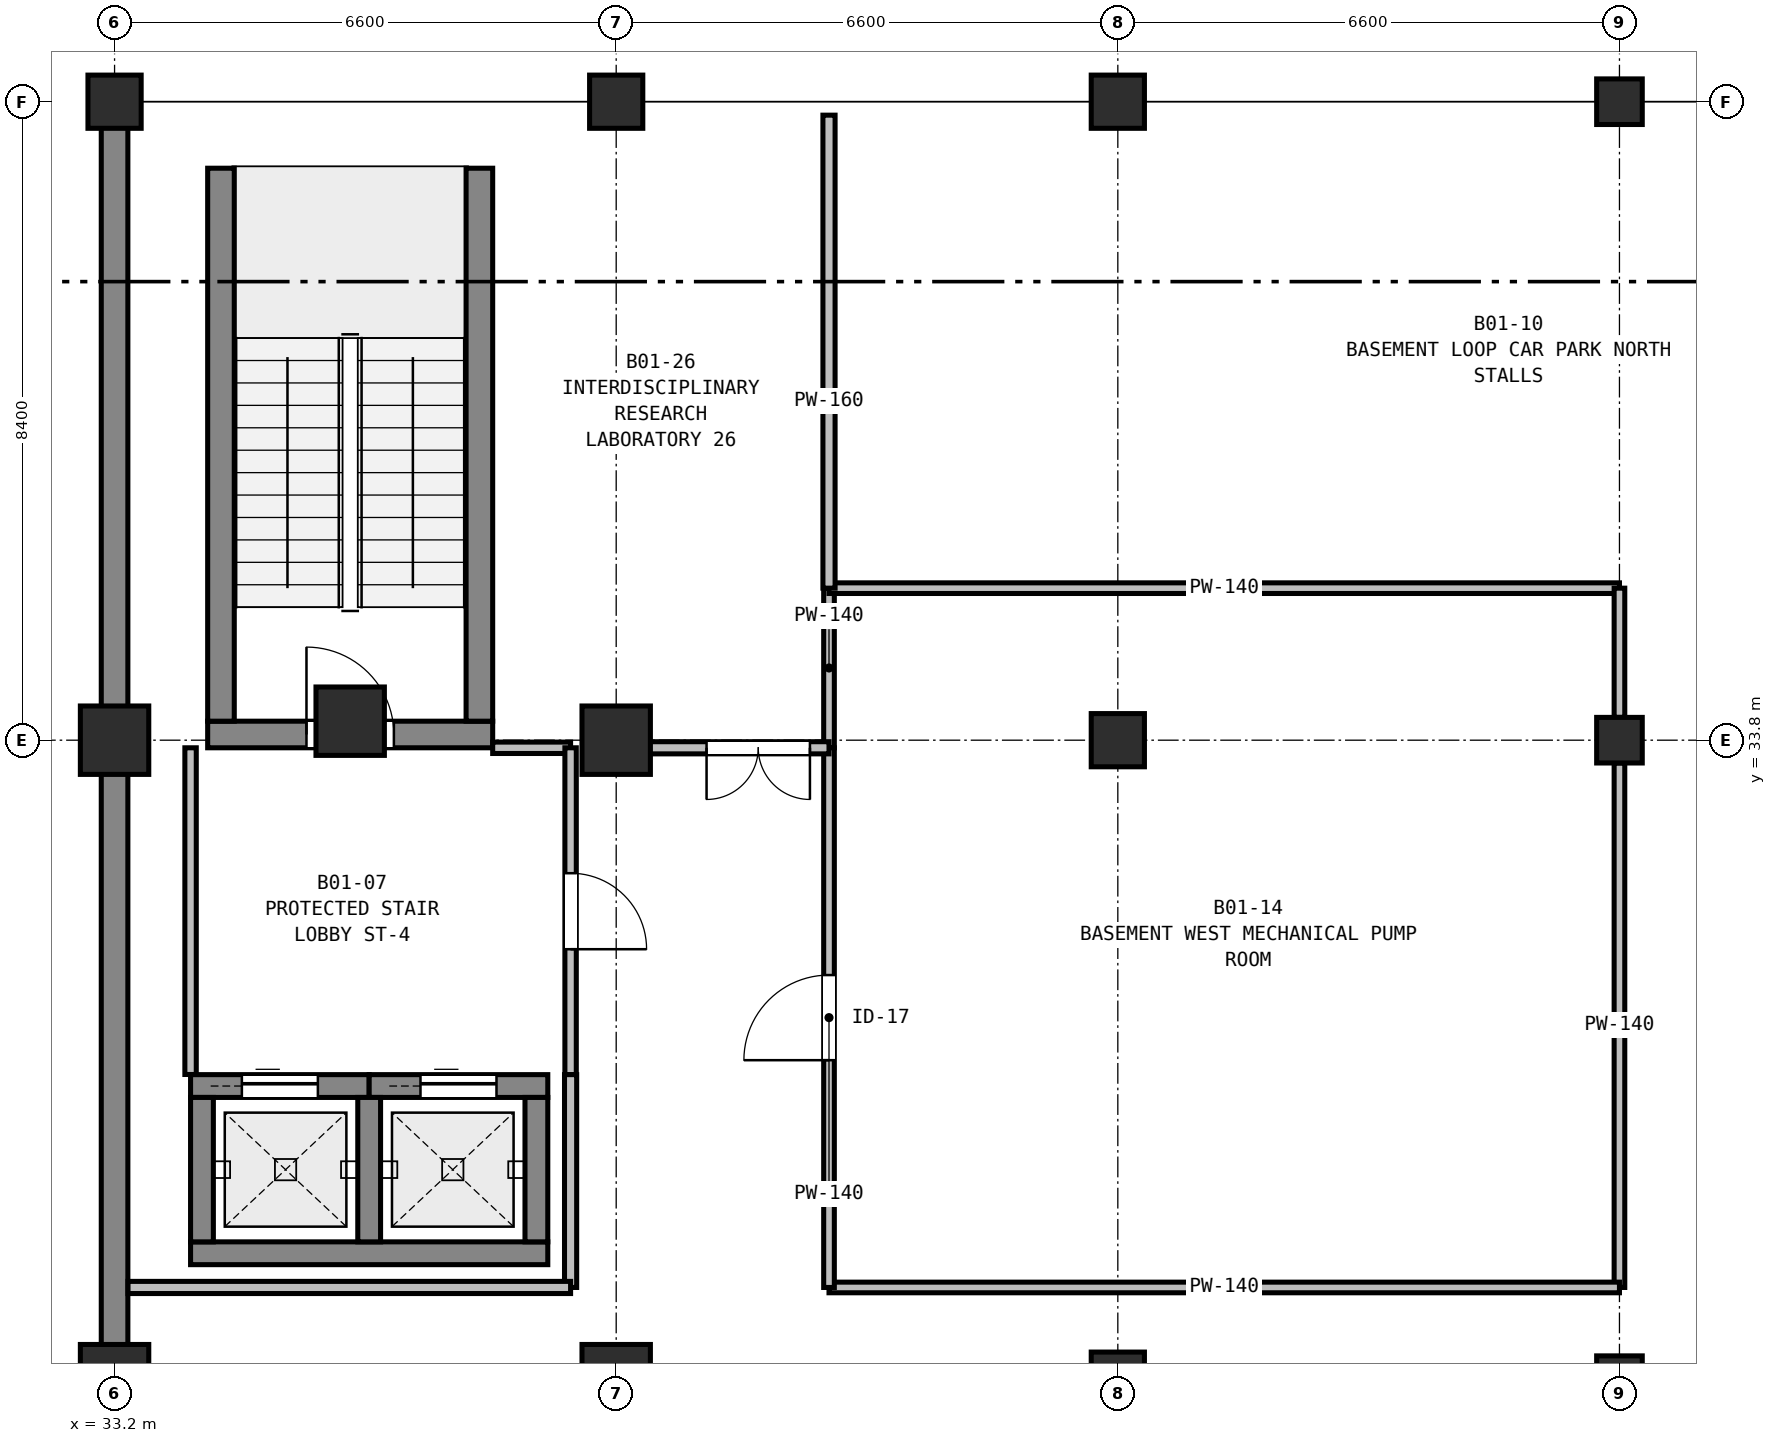
"""IFC4 building model, lengths in metres.
Left out: names, types, materials, properties, quantities, classifications, styles, units other than length and angle.
Written with IfcOpenShell. Run it as: python <this file> out.ifc"""

import sys

from ifc_helpers import new_model, si_unit, direction, frame, frame_2d, origin, origin_2d, place, context, subcontext, project, spatial, rectangle, extrude, element, fill, save


model = new_model("IFC4")
c1 = context("Model", 3, precision=1e-05, world=origin(), true_north=direction((0.0, 1.0)))
c2 = subcontext(c1, "Body", "Model", "MODEL_VIEW")
j1 = project(units=[si_unit("LENGTHUNIT", "METRE"), si_unit("PLANEANGLEUNIT", "RADIAN")], contexts=[c1])
p1 = place(None, origin())
s1 = spatial("IfcSite", under=j1, at=p1, CompositionType="ELEMENT")
p2 = place(p1, origin())
s2 = spatial("IfcBuilding", under=s1, at=p2, CompositionType="ELEMENT")
p3 = place(p2, frame((0.0, 0.0, -4.5)))
s3 = spatial("IfcBuildingStorey", under=s2, at=p3, CompositionType="ELEMENT", Elevation=-4.5)
for number, where, z_axis, x_axis in (
    (1, (33.2, 25.4, 0.0), (0.0, 0.0, 1.0), (1.0, 0.0, 0.0)),
    (2, (33.2, 33.8, 0.0), (0.0, 0.0, 1.0), (1.0, 0.0, 0.0)),
    (3, (33.2, 42.2, 0.0), (0.0, 0.0, 1.0), (1.0, 0.0, 0.0)),
    (4, (39.8, 25.4, 0.0), (0.0, 0.0, 1.0), (1.0, 0.0, 0.0)),
    (5, (39.8, 33.8, 0.0), (0.0, 0.0, 1.0), (1.0, 0.0, 0.0)),
    (6, (39.8, 42.2, 0.0), (0.0, 0.0, 1.0), (1.0, 0.0, 0.0)),
    (7, (46.4, 25.4, 0.0), (0.0, 0.0, 1.0), (1.0, 0.0, 0.0)),
    (8, (46.4, 33.8, 0.0), (0.0, 0.0, 1.0), (1.0, 0.0, 0.0)),
    (9, (46.4, 42.2, 0.0), (0.0, 0.0, 1.0), (1.0, 0.0, 0.0)),
):
    element("IfcColumn", number, at=place(p3, frame(where, z_axis=z_axis, x_axis=x_axis)), inside=s3, PredefinedType="COLUMN", context=c2, shape_type="SweptSolid", body=[
        extrude(rectangle(XDim=0.7, YDim=0.7, at=origin_2d()), origin(), (0.0, 0.0, 1.0), 4.5),
    ])
for number, where, z_axis, x_axis in (
    (10, (53.0, 25.4, 0.0), (0.0, 0.0, 1.0), (1.0, 0.0, 0.0)),
    (11, (53.0, 33.8, 0.0), (0.0, 0.0, 1.0), (1.0, 0.0, 0.0)),
    (12, (53.0, 42.2, 0.0), (0.0, 0.0, 1.0), (1.0, 0.0, 0.0)),
):
    element("IfcColumn", number, at=place(p3, frame(where, z_axis=z_axis, x_axis=x_axis)), inside=s3, PredefinedType="COLUMN", context=c2, shape_type="SweptSolid", body=[
        extrude(rectangle(XDim=0.6, YDim=0.6, at=origin_2d()), origin(), (0.0, 0.0, 1.0), 4.44),
    ])
p4 = place(p3, frame((34.425, 33.875, 0.0), z_axis=(0.0, 0.0, 1.0), x_axis=(1.0, 0.0, 0.0)))
e13 = element("IfcWall", 13, at=p4, inside=s3, PredefinedType="SHEAR", context=c2, shape_type="SweptSolid", body=[
    extrude(rectangle(XDim=3.75, YDim=0.35, at=frame_2d((1.875, 0.0))), origin(), (0.0, 0.0, 1.0), 4.5),
])
p5 = place(p4, frame((1.3, 0.0, 0.0)))
e14 = element("IfcOpeningElement", 14, at=p5, cuts=e13, PredefinedType="OPENING", context=c2, shape_type="SweptSolid", body=[
    extrude(rectangle(XDim=1.15, YDim=2.15, at=frame_2d((0.575, 1.075))), frame((0.0, 0.185, 0.0), z_axis=(0.0, -1.0, 0.0), x_axis=(1.0, 0.0, 0.0)), (0.0, 0.0, 1.0), 0.37),
])
p6 = place(p3, frame((34.425, 41.5, 0.0), z_axis=(0.0, 0.0, 1.0), x_axis=(1.0, 0.0, 0.0)))
e15 = element("IfcWall", 15, at=p6, inside=s3, PredefinedType="SHEAR", context=c2, shape_type="SweptSolid", body=[
    extrude(rectangle(XDim=3.75, YDim=0.35, at=frame_2d((1.875, 0.0))), origin(), (0.0, 0.0, 1.0), 4.5),
])
for number, where, z_axis, x_axis in (
    (16, (34.6, 34.05, 0.0), (0.0, 0.0, 1.0), (0.0, 1.0, 0.0)),
    (17, (38.0, 34.05, 0.0), (0.0, 0.0, 1.0), (0.0, 1.0, 0.0)),
):
    element("IfcWall", number, at=place(p3, frame(where, z_axis=z_axis, x_axis=x_axis)), inside=s3, PredefinedType="SHEAR", context=c2, shape_type="SweptSolid", body=[
        extrude(rectangle(XDim=7.275, YDim=0.35, at=frame_2d((3.637, 0.0))), origin(), (0.0, 0.0, 1.0), 4.5),
    ])
p7 = place(p3, frame((34.2, 27.05, -0.82), z_axis=(0.0, 0.0, 1.0), x_axis=(1.0, 0.0, 0.0)))
e18 = element("IfcWall", 18, at=p7, inside=s3, PredefinedType="SHEAR", context=c2, shape_type="SweptSolid", body=[
    extrude(rectangle(XDim=4.7, YDim=0.3, at=frame_2d((2.35, 0.0))), origin(), (0.0, 0.0, 1.0), 5.32),
])
p8 = place(p3, frame((34.2, 29.25, -0.82), z_axis=(0.0, 0.0, 1.0), x_axis=(1.0, 0.0, 0.0)))
e19 = element("IfcWall", 19, at=p8, inside=s3, PredefinedType="SHEAR", context=c2, shape_type="SweptSolid", body=[
    extrude(rectangle(XDim=2.35, YDim=0.3, at=frame_2d((1.175, 0.0))), origin(), (0.0, 0.0, 1.0), 5.32),
])
p9 = place(p8, frame((0.675, 0.0, 0.82)))
e20 = element("IfcOpeningElement", 20, at=p9, cuts=e19, PredefinedType="OPENING", context=c2, shape_type="SweptSolid", body=[
    extrude(rectangle(XDim=1.0, YDim=2.1, at=frame_2d((0.5, 1.05))), frame((0.0, 0.16, 0.0), z_axis=(0.0, -1.0, 0.0), x_axis=(1.0, 0.0, 0.0)), (0.0, 0.0, 1.0), 0.32),
])
p10 = place(p3, frame((36.55, 29.25, -0.82), z_axis=(0.0, 0.0, 1.0), x_axis=(1.0, 0.0, 0.0)))
e21 = element("IfcWall", 21, at=p10, inside=s3, PredefinedType="SHEAR", context=c2, shape_type="SweptSolid", body=[
    extrude(rectangle(XDim=2.35, YDim=0.3, at=frame_2d((1.175, 0.0))), origin(), (0.0, 0.0, 1.0), 5.32),
])
p11 = place(p10, frame((0.675, 0.0, 0.82)))
e22 = element("IfcOpeningElement", 22, at=p11, cuts=e21, PredefinedType="OPENING", context=c2, shape_type="SweptSolid", body=[
    extrude(rectangle(XDim=1.0, YDim=2.1, at=frame_2d((0.5, 1.05))), frame((0.0, 0.16, 0.0), z_axis=(0.0, -1.0, 0.0), x_axis=(1.0, 0.0, 0.0)), (0.0, 0.0, 1.0), 0.32),
])
for number, where, z_axis, x_axis in (
    (23, (34.35, 27.2, -0.82), (0.0, 0.0, 1.0), (0.0, 1.0, 0.0)),
    (24, (36.55, 27.2, -0.82), (0.0, 0.0, 1.0), (0.0, 1.0, 0.0)),
    (25, (38.75, 27.2, -0.82), (0.0, 0.0, 1.0), (0.0, 1.0, 0.0)),
):
    element("IfcWall", number, at=place(p3, frame(where, z_axis=z_axis, x_axis=x_axis)), inside=s3, PredefinedType="SHEAR", context=c2, shape_type="SweptSolid", body=[
        extrude(rectangle(XDim=1.9, YDim=0.3, at=frame_2d((0.95, 0.0))), origin(), (0.0, 0.0, 1.0), 5.32),
    ])
p12 = place(p3, frame((33.2, 16.15, 0.0), z_axis=(0.0, 0.0, 1.0), x_axis=(0.0, 1.0, 0.0)))
e26 = element("IfcWall", 26, at=p12, inside=s3, PredefinedType="SOLIDWALL", context=c2, shape_type="SweptSolid", body=[
    extrude(rectangle(XDim=25.875, YDim=0.35, at=frame_2d((12.938, 0.0))), origin(), (0.0, 0.0, 1.0), 4.5),
])
p13 = place(p3, frame((33.025, 42.2, 0.0), z_axis=(0.0, 0.0, 1.0), x_axis=(1.0, 0.0, 0.0)))
e27 = element("IfcWall", 27, at=p13, inside=s3, PredefinedType="SOLIDWALL", context=c2, shape_type="SweptSolid", body=[
    extrude(rectangle(XDim=66.35, YDim=0.35, at=frame_2d((33.175, 0.0))), origin(), (0.0, 0.0, 1.0), 4.5),
])
for number, where, z_axis, x_axis in (
    (28, (33.2, 25.4, -1.2), (0.0, 0.0, 1.0), (1.0, 0.0, 0.0)),
    (29, (33.2, 33.8, -1.2), (0.0, 0.0, 1.0), (1.0, 0.0, 0.0)),
    (30, (36.3, 34.05, -1.2), (0.0, 0.0, 1.0), (1.0, 0.0, 0.0)),
    (31, (39.8, 25.4, -1.2), (0.0, 0.0, 1.0), (1.0, 0.0, 0.0)),
    (32, (39.8, 33.8, -1.2), (0.0, 0.0, 1.0), (1.0, 0.0, 0.0)),
):
    element("IfcColumn", number, at=place(p3, frame(where, z_axis=z_axis, x_axis=x_axis)), inside=s3, PredefinedType="COLUMN", context=c2, shape_type="SweptSolid", body=[
        extrude(rectangle(XDim=0.9, YDim=0.9, at=origin_2d()), origin(), (0.0, 0.0, 1.0), 1.2),
    ])
p14 = place(p3, frame((38.175, 33.7, 0.0), z_axis=(0.0, 0.0, 1.0), x_axis=(1.0, 0.0, 0.0)))
e33 = element("IfcWall", 33, at=p14, inside=s3, PredefinedType="PARTITIONING", context=c2, shape_type="SweptSolid", body=[
    extrude(rectangle(XDim=1.025, YDim=0.15, at=frame_2d((0.512, 0.0))), origin(), (0.0, 0.0, 1.0), 3.835),
])
p15 = place(p3, frame((39.2, 33.7, 0.0), z_axis=(0.0, 0.0, 1.0), x_axis=(0.0, -1.0, 0.0)))
e34 = element("IfcWall", 34, at=p15, inside=s3, PredefinedType="PARTITIONING", context=c2, shape_type="SweptSolid", body=[
    extrude(rectangle(XDim=4.3, YDim=0.15, at=frame_2d((2.15, 0.0))), origin(), (0.0, 0.0, 1.0), 3.835),
])
p16 = place(p15, frame((1.65, 0.0, 0.0)))
e35 = element("IfcOpeningElement", 35, at=p16, cuts=e34, PredefinedType="OPENING", context=c2, shape_type="SweptSolid", body=[
    extrude(rectangle(XDim=1.0, YDim=2.1, at=frame_2d((0.5, 1.05))), frame((0.0, 0.085, 0.0), z_axis=(0.0, -1.0, 0.0), x_axis=(1.0, 0.0, 0.0)), (0.0, 0.0, 1.0), 0.17),
])
p17 = place(p3, frame((34.2, 29.402, 0.0), z_axis=(0.0, 0.0, 1.0), x_axis=(0.0, 1.0, 0.0)))
e36 = element("IfcWall", 36, at=p17, inside=s3, PredefinedType="PARTITIONING", context=c2, shape_type="SweptSolid", body=[
    extrude(rectangle(XDim=4.298, YDim=0.15, at=frame_2d((2.149, 0.0))), origin(), (0.0, 0.0, 1.0), 3.835),
])
p18 = place(p3, frame((42.6, 33.7, 0.0), z_axis=(0.0, 0.0, 1.0), x_axis=(0.0, 1.0, 0.0)))
e37 = element("IfcWall", 37, at=p18, inside=s3, PredefinedType="PARTITIONING", context=c2, shape_type="SweptSolid", body=[
    extrude(rectangle(XDim=2.1, YDim=0.14, at=frame_2d((1.05, 0.0))), origin(), (0.0, 0.0, 1.0), 3.835),
])
p19 = place(p3, frame((42.6, 35.8, 0.0), z_axis=(0.0, 0.0, 1.0), x_axis=(1.0, 0.0, 0.0)))
e38 = element("IfcWall", 38, at=p19, inside=s3, PredefinedType="PARTITIONING", context=c2, shape_type="SweptSolid", body=[
    extrude(rectangle(XDim=10.4, YDim=0.14, at=frame_2d((5.2, 0.0))), origin(), (0.0, 0.0, 1.0), 3.635),
])
p20 = place(p3, frame((53.0, 35.8, 0.0), z_axis=(0.0, 0.0, 1.0), x_axis=(0.0, -1.0, 0.0)))
e39 = element("IfcWall", 39, at=p20, inside=s3, PredefinedType="PARTITIONING", context=c2, shape_type="SweptSolid", body=[
    extrude(rectangle(XDim=1.7, YDim=0.14, at=frame_2d((0.85, 0.0))), origin(), (0.0, 0.0, 1.0), 3.635),
])
p21 = place(p3, frame((53.0, 33.5, 0.0), z_axis=(0.0, 0.0, 1.0), x_axis=(0.0, -1.0, 0.0)))
e40 = element("IfcWall", 40, at=p21, inside=s3, PredefinedType="PARTITIONING", context=c2, shape_type="SweptSolid", body=[
    extrude(rectangle(XDim=6.9, YDim=0.14, at=frame_2d((3.45, 0.0))), origin(), (0.0, 0.0, 1.0), 3.635),
])
p22 = place(p3, frame((53.0, 26.6, 0.0), z_axis=(0.0, 0.0, 1.0), x_axis=(-1.0, 0.0, 0.0)))
e41 = element("IfcWall", 41, at=p22, inside=s3, PredefinedType="PARTITIONING", context=c2, shape_type="SweptSolid", body=[
    extrude(rectangle(XDim=10.4, YDim=0.14, at=frame_2d((5.2, 0.0))), origin(), (0.0, 0.0, 1.0), 3.635),
])
p23 = place(p3, frame((42.6, 26.6, 0.0), z_axis=(0.0, 0.0, 1.0), x_axis=(0.0, 1.0, 0.0)))
e42 = element("IfcWall", 42, at=p23, inside=s3, PredefinedType="PARTITIONING", context=c2, shape_type="SweptSolid", body=[
    extrude(rectangle(XDim=7.1, YDim=0.14, at=frame_2d((3.55, 0.0))), origin(), (0.0, 0.0, 1.0), 3.835),
])
p24 = place(p23, frame((2.99, 0.0, 0.0)))
e43 = element("IfcOpeningElement", 43, at=p24, cuts=e42, PredefinedType="OPENING", context=c2, shape_type="SweptSolid", body=[
    extrude(rectangle(XDim=1.12, YDim=2.1, at=frame_2d((0.56, 1.05))), frame((0.0, 0.08, 0.0), z_axis=(0.0, -1.0, 0.0), x_axis=(1.0, 0.0, 0.0)), (0.0, 0.0, 1.0), 0.16),
])
p25 = place(p3, frame((42.6, 42.023, 0.0), z_axis=(0.0, 0.0, 1.0), x_axis=(0.0, -1.0, 0.0)))
e44 = element("IfcWall", 44, at=p25, inside=s3, PredefinedType="PARTITIONING", context=c2, shape_type="SweptSolid", body=[
    extrude(rectangle(XDim=6.223, YDim=0.16, at=frame_2d((3.111, 0.0))), origin(), (0.0, 0.0, 1.0), 4.175),
])
p26 = place(p3, frame((42.6, 33.7, 0.0), z_axis=(0.0, 0.0, 1.0), x_axis=(-1.0, 0.0, 0.0)))
e45 = element("IfcWall", 45, at=p26, inside=s3, PredefinedType="PARTITIONING", context=c2, shape_type="SweptSolid", body=[
    extrude(rectangle(XDim=2.45, YDim=0.16, at=frame_2d((1.225, 0.0))), origin(), (0.0, 0.0, 1.0), 3.835),
])
p27 = place(p26, frame((0.251, 0.0, 0.0)))
e46 = element("IfcOpeningElement", 46, at=p27, cuts=e45, PredefinedType="OPENING", context=c2, shape_type="SweptSolid", body=[
    extrude(rectangle(XDim=1.36, YDim=2.14, at=frame_2d((0.68, 1.07))), frame((0.0, 0.09, 0.0), z_axis=(0.0, -1.0, 0.0), x_axis=(1.0, 0.0, 0.0)), (0.0, 0.0, 1.0), 0.18),
])
p28 = place(p3, frame((39.2, 29.4, 0.0), z_axis=(0.0, 0.0, 1.0), x_axis=(0.0, -1.0, 0.0)))
e47 = element("IfcWall", 47, at=p28, inside=s3, PredefinedType="PARTITIONING", context=c2, shape_type="SweptSolid", body=[
    extrude(rectangle(XDim=2.8, YDim=0.16, at=frame_2d((1.4, 0.0))), origin(), (0.0, 0.0, 1.0), 4.175),
])
p29 = place(p3, frame((39.2, 26.6, 0.0), z_axis=(0.0, 0.0, 1.0), x_axis=(-1.0, 0.0, 0.0)))
e48 = element("IfcWall", 48, at=p29, inside=s3, PredefinedType="PARTITIONING", context=c2, shape_type="SweptSolid", body=[
    extrude(rectangle(XDim=5.823, YDim=0.16, at=frame_2d((2.912, 0.0))), origin(), (0.0, 0.0, 1.0), 4.035),
])
p30 = place(p5, origin())
e49 = element("IfcDoor", 49, at=p30, inside=s3, OperationType="SINGLE_SWING_LEFT", PredefinedType="DOOR", context=c2, shape_type="SweptSolid", body=[
    extrude(rectangle(XDim=1.15, YDim=2.15, at=frame_2d((0.575, 1.075))), frame((0.0, 0.025, 0.0), z_axis=(0.0, -1.0, 0.0), x_axis=(1.0, 0.0, 0.0)), (0.0, 0.0, 1.0), 0.05),
])
fill(e14, e49)
p31 = place(p9, origin())
e50 = element("IfcDoor", 50, at=p31, inside=s3, OperationType="SLIDING_TO_LEFT", PredefinedType="DOOR", context=c2, shape_type="SweptSolid", body=[
    extrude(rectangle(XDim=1.0, YDim=2.1, at=frame_2d((0.5, 1.05))), frame((0.0, 0.025, 0.0), z_axis=(0.0, -1.0, 0.0), x_axis=(1.0, 0.0, 0.0)), (0.0, 0.0, 1.0), 0.05),
])
fill(e20, e50)
p32 = place(p11, origin())
e51 = element("IfcDoor", 51, at=p32, inside=s3, OperationType="SLIDING_TO_LEFT", PredefinedType="DOOR", context=c2, shape_type="SweptSolid", body=[
    extrude(rectangle(XDim=1.0, YDim=2.1, at=frame_2d((0.5, 1.05))), frame((0.0, 0.025, 0.0), z_axis=(0.0, -1.0, 0.0), x_axis=(1.0, 0.0, 0.0)), (0.0, 0.0, 1.0), 0.05),
])
fill(e22, e51)
p33 = place(p16, origin())
e52 = element("IfcDoor", 52, at=p33, inside=s3, OperationType="SINGLE_SWING_RIGHT", PredefinedType="DOOR", context=c2, shape_type="SweptSolid", body=[
    extrude(rectangle(XDim=1.0, YDim=2.1, at=frame_2d((0.5, 1.05))), frame((0.0, 0.025, 0.0), z_axis=(0.0, -1.0, 0.0), x_axis=(1.0, 0.0, 0.0)), (0.0, 0.0, 1.0), 0.05),
])
fill(e35, e52)
p34 = place(p24, origin())
e53 = element("IfcDoor", 53, at=p34, inside=s3, OperationType="SINGLE_SWING_LEFT", PredefinedType="DOOR", context=c2, shape_type="SweptSolid", body=[
    extrude(rectangle(XDim=1.12, YDim=2.1, at=frame_2d((0.56, 1.05))), frame((0.0, 0.025, 0.0), z_axis=(0.0, -1.0, 0.0), x_axis=(1.0, 0.0, 0.0)), (0.0, 0.0, 1.0), 0.05),
])
fill(e43, e53)
p35 = place(p27, origin())
e54 = element("IfcDoor", 54, at=p35, inside=s3, OperationType="DOUBLE_DOOR_SINGLE_SWING", PredefinedType="DOOR", context=c2, shape_type="SweptSolid", body=[
    extrude(rectangle(XDim=1.36, YDim=2.14, at=frame_2d((0.68, 1.07))), frame((0.0, 0.025, 0.0), z_axis=(0.0, -1.0, 0.0), x_axis=(1.0, 0.0, 0.0)), (0.0, 0.0, 1.0), 0.05),
])
fill(e46, e54)
save(model, sys.argv[1])
